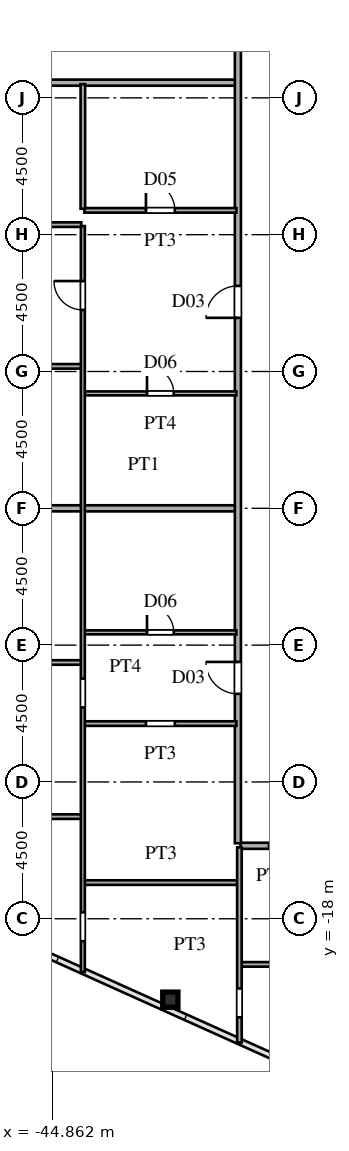
"""IFC4 building model, lengths in metres.
Left out: names, types, materials, properties, quantities, classifications, styles, units other than length and angle.
Written with IfcOpenShell. Run it as: python <this file> out.ifc"""

import sys

from ifc_helpers import new_model, si_unit, direction, frame, frame_2d, origin, origin_2d, place, context, subcontext, project, spatial, rectangle, hollow_rectangle, extrude, source, transform, mapped, element, fill, save


model = new_model("IFC4")
c1 = context("Model", 3, precision=1e-05, world=origin(), true_north=direction((0.0, 1.0)))
c2 = subcontext(c1, "Body", "Model", "MODEL_VIEW")
j1 = project(units=[si_unit("LENGTHUNIT", "METRE"), si_unit("PLANEANGLEUNIT", "RADIAN")], contexts=[c1])
p1 = place(None, origin())
s1 = spatial("IfcSite", under=j1, at=p1, CompositionType="ELEMENT")
p2 = place(p1, origin())
s2 = spatial("IfcBuilding", under=s1, at=p2, CompositionType="ELEMENT")
p3 = place(p2, frame((0.0, 0.0, 65.7)))
s3 = spatial("IfcBuildingStorey", under=s2, at=p3, CompositionType="ELEMENT", Elevation=65.7)
m1 = source(origin(), c2, "Body", "SweptSolid", [
    extrude(hollow_rectangle(XDim=0.5, YDim=0.5, WallThickness=0.02, at=origin_2d()), origin(), (0.0, 0.0, 1.0), 3.6),
])
p4 = place(p3, frame((-40.973, -20.661, 0.0), z_axis=(0.0, 0.0, 1.0), x_axis=(1.0, 0.0, 0.0)))
e1 = element("IfcColumn", 1, at=p4, inside=s3, PredefinedType="COLUMN", context=c2, shape_type="MappedRepresentation", body=[
    mapped(m1, transform((0.0, 0.0, 0.0), scale=1.0)),
])
p5 = place(p3, frame((-38.65, -19.5, 0.0), z_axis=(0.0, 0.0, 1.0), x_axis=(1.0, 0.0, 0.0)))
e2 = element("IfcWall", 2, at=p5, inside=s3, PredefinedType="PARTITIONING", context=c2, shape_type="SweptSolid", body=[
    extrude(rectangle(XDim=11.185, YDim=0.15, at=frame_2d((5.592, 0.0))), origin(), (0.0, 0.0, 1.0), 3.38),
])
p6 = place(p5, frame((5.075, 0.0, 0.0)))
e3 = element("IfcOpeningElement", 3, at=p6, cuts=e2, PredefinedType="OPENING", context=c2, shape_type="SweptSolid", body=[
    extrude(rectangle(XDim=0.95, YDim=2.15, at=frame_2d((0.475, 1.075))), frame((0.0, 0.085, 0.0), z_axis=(0.0, -1.0, 0.0), x_axis=(1.0, 0.0, 0.0)), (0.0, 0.0, 1.0), 0.17),
])
p7 = place(p3, frame((-43.8, -16.81, 0.0), z_axis=(0.0, 0.0, 1.0), x_axis=(1.0, 0.0, 0.0)))
e4 = element("IfcWall", 4, at=p7, inside=s3, PredefinedType="PARTITIONING", context=c2, shape_type="SweptSolid", body=[
    extrude(rectangle(XDim=5.05, YDim=0.15, at=frame_2d((2.525, 0.0))), origin(), (0.0, 0.0, 1.0), 3.38),
])
p8 = place(p3, frame((-38.665, -15.6, 0.0), z_axis=(0.0, 0.0, 1.0), x_axis=(1.0, 0.0, 0.0)))
e5 = element("IfcWall", 5, at=p8, inside=s3, PredefinedType="PARTITIONING", context=c2, shape_type="SweptSolid", body=[
    extrude(rectangle(XDim=2.08, YDim=0.2, at=frame_2d((1.04, 0.0))), origin(), (0.0, 0.0, 1.0), 3.38),
])
p9 = place(p3, frame((-54.45, -14.64, 0.0), z_axis=(0.0, 0.0, 1.0), x_axis=(1.0, 0.0, 0.0)))
e6 = element("IfcWall", 6, at=p9, inside=s3, PredefinedType="PARTITIONING", context=c2, shape_type="SweptSolid", body=[
    extrude(rectangle(XDim=10.55, YDim=0.15, at=frame_2d((5.275, 0.0))), origin(), (0.0, 0.0, 1.0), 3.38),
])
p10 = place(p9, frame((4.8, 0.0, 0.0)))
e7 = element("IfcOpeningElement", 7, at=p10, cuts=e6, PredefinedType="OPENING", context=c2, shape_type="SweptSolid", body=[
    extrude(rectangle(XDim=0.95, YDim=2.15, at=frame_2d((0.475, 1.075))), frame((0.0, 0.085, 0.0), z_axis=(0.0, -1.0, 0.0), x_axis=(1.0, 0.0, 0.0)), (0.0, 0.0, 1.0), 0.17),
])
p11 = place(p3, frame((-43.8, -11.58, 0.0), z_axis=(0.0, 0.0, 1.0), x_axis=(1.0, 0.0, 0.0)))
e8 = element("IfcWall", 8, at=p11, inside=s3, PredefinedType="PARTITIONING", context=c2, shape_type="SweptSolid", body=[
    extrude(rectangle(XDim=5.0, YDim=0.15, at=frame_2d((2.5, 0.0))), origin(), (0.0, 0.0, 1.0), 3.38),
])
p12 = place(p11, frame((2.025, 0.0, 0.0)))
e9 = element("IfcOpeningElement", 9, at=p12, cuts=e8, PredefinedType="OPENING", context=c2, shape_type="SweptSolid", body=[
    extrude(rectangle(XDim=0.95, YDim=2.15, at=frame_2d((0.475, 1.075))), frame((0.0, 0.085, 0.0), z_axis=(0.0, -1.0, 0.0), x_axis=(1.0, 0.0, 0.0)), (0.0, 0.0, 1.0), 0.17),
])
p13 = place(p3, frame((-66.429, -9.57, 0.0), z_axis=(0.0, 0.0, 1.0), x_axis=(1.0, 0.0, 0.0)))
e10 = element("IfcWall", 10, at=p13, inside=s3, PredefinedType="PARTITIONING", context=c2, shape_type="SweptSolid", body=[
    extrude(rectangle(XDim=22.529, YDim=0.15, at=frame_2d((11.265, 0.0))), origin(), (0.0, 0.0, 1.0), 3.38),
])
p14 = place(p13, frame((16.779, 0.0, 0.0)))
e11 = element("IfcOpeningElement", 11, at=p14, cuts=e10, PredefinedType="OPENING", context=c2, shape_type="SweptSolid", body=[
    extrude(rectangle(XDim=0.95, YDim=2.15, at=frame_2d((0.475, 1.075))), frame((0.0, 0.085, 0.0), z_axis=(0.0, -1.0, 0.0), x_axis=(1.0, 0.0, 0.0)), (0.0, 0.0, 1.0), 0.17),
])
p15 = place(p3, frame((-43.8, -8.58, 0.0), z_axis=(0.0, 0.0, 1.0), x_axis=(1.0, 0.0, 0.0)))
e12 = element("IfcWall", 12, at=p15, inside=s3, PredefinedType="PARTITIONING", context=c2, shape_type="SweptSolid", body=[
    extrude(rectangle(XDim=5.0, YDim=0.13, at=frame_2d((2.5, 0.0))), origin(), (0.0, 0.0, 1.0), 3.38),
])
p16 = place(p15, frame((2.06, 0.0, 0.0)))
e13 = element("IfcOpeningElement", 13, at=p16, cuts=e12, PredefinedType="OPENING", context=c2, shape_type="SweptSolid", body=[
    extrude(rectangle(XDim=0.88, YDim=2.1, at=frame_2d((0.44, 1.05))), frame((0.0, 0.075, 0.0), z_axis=(0.0, -1.0, 0.0), x_axis=(1.0, 0.0, 0.0)), (0.0, 0.0, 1.0), 0.15),
])
p17 = place(p3, frame((-54.52, -4.5, 0.0), z_axis=(0.0, 0.0, 1.0), x_axis=(1.0, 0.0, 0.0)))
e14 = element("IfcWall", 14, at=p17, inside=s3, PredefinedType="PARTITIONING", context=c2, shape_type="SweptSolid", body=[
    extrude(rectangle(XDim=15.69, YDim=0.2, at=frame_2d((7.845, 0.0))), origin(), (0.0, 0.0, 1.0), 2.68),
])
p18 = place(p3, frame((-43.8, -0.72, 0.0), z_axis=(0.0, 0.0, 1.0), x_axis=(1.0, 0.0, 0.0)))
e15 = element("IfcWall", 15, at=p18, inside=s3, PredefinedType="PARTITIONING", context=c2, shape_type="SweptSolid", body=[
    extrude(rectangle(XDim=5.0, YDim=0.13, at=frame_2d((2.5, 0.0))), origin(), (0.0, 0.0, 1.0), 3.38),
])
p19 = place(p18, frame((2.06, 0.0, 0.0)))
e16 = element("IfcOpeningElement", 16, at=p19, cuts=e15, PredefinedType="OPENING", context=c2, shape_type="SweptSolid", body=[
    extrude(rectangle(XDim=0.88, YDim=2.1, at=frame_2d((0.44, 1.05))), frame((0.0, 0.075, 0.0), z_axis=(0.0, -1.0, 0.0), x_axis=(1.0, 0.0, 0.0)), (0.0, 0.0, 1.0), 0.15),
])
p20 = place(p3, frame((-71.035, 0.17, 0.0), z_axis=(0.0, 0.0, 1.0), x_axis=(1.0, 0.0, 0.0)))
e17 = element("IfcWall", 17, at=p20, inside=s3, PredefinedType="PARTITIONING", context=c2, shape_type="SweptSolid", body=[
    extrude(rectangle(XDim=27.135, YDim=0.15, at=frame_2d((13.567, 0.0))), origin(), (0.0, 0.0, 1.0), 3.38),
])
p21 = place(p20, frame((21.385, 0.0, 0.0)))
e18 = element("IfcOpeningElement", 18, at=p21, cuts=e17, PredefinedType="OPENING", context=c2, shape_type="SweptSolid", body=[
    extrude(rectangle(XDim=0.95, YDim=2.15, at=frame_2d((0.475, 1.075))), frame((0.0, 0.085, 0.0), z_axis=(0.0, -1.0, 0.0), x_axis=(1.0, 0.0, 0.0)), (0.0, 0.0, 1.0), 0.17),
])
p22 = place(p20, frame((13.21, 0.0, 0.0)))
e19 = element("IfcOpeningElement", 19, at=p22, cuts=e17, PredefinedType="OPENING", context=c2, shape_type="SweptSolid", body=[
    extrude(rectangle(XDim=0.95, YDim=2.15, at=frame_2d((0.475, 1.075))), frame((0.0, 0.085, 0.0), z_axis=(0.0, -1.0, 0.0), x_axis=(1.0, 0.0, 0.0)), (0.0, 0.0, 1.0), 0.17),
])
p23 = place(p3, frame((-71.035, 4.83, 0.0), z_axis=(0.0, 0.0, 1.0), x_axis=(1.0, 0.0, 0.0)))
e20 = element("IfcWall", 20, at=p23, inside=s3, PredefinedType="PARTITIONING", context=c2, shape_type="SweptSolid", body=[
    extrude(rectangle(XDim=27.135, YDim=0.15, at=frame_2d((13.567, 0.0))), origin(), (0.0, 0.0, 1.0), 3.38),
])
p24 = place(p23, frame((21.385, 0.0, 0.0)))
e21 = element("IfcOpeningElement", 21, at=p24, cuts=e20, PredefinedType="OPENING", context=c2, shape_type="SweptSolid", body=[
    extrude(rectangle(XDim=0.95, YDim=2.15, at=frame_2d((0.475, 1.075))), frame((0.0, 0.085, 0.0), z_axis=(0.0, -1.0, 0.0), x_axis=(1.0, 0.0, 0.0)), (0.0, 0.0, 1.0), 0.17),
])
p25 = place(p23, frame((13.21, 0.0, 0.0)))
e22 = element("IfcOpeningElement", 22, at=p25, cuts=e20, PredefinedType="OPENING", context=c2, shape_type="SweptSolid", body=[
    extrude(rectangle(XDim=0.95, YDim=2.15, at=frame_2d((0.475, 1.075))), frame((0.0, 0.085, 0.0), z_axis=(0.0, -1.0, 0.0), x_axis=(1.0, 0.0, 0.0)), (0.0, 0.0, 1.0), 0.17),
])
p26 = place(p3, frame((-43.8, 5.3, 0.0), z_axis=(0.0, 0.0, 1.0), x_axis=(1.0, 0.0, 0.0)))
e23 = element("IfcWall", 23, at=p26, inside=s3, PredefinedType="PARTITIONING", context=c2, shape_type="SweptSolid", body=[
    extrude(rectangle(XDim=5.0, YDim=0.15, at=frame_2d((2.5, 0.0))), origin(), (0.0, 0.0, 1.0), 3.38),
])
p27 = place(p26, frame((2.025, 0.0, 0.0)))
e24 = element("IfcOpeningElement", 24, at=p27, cuts=e23, PredefinedType="OPENING", context=c2, shape_type="SweptSolid", body=[
    extrude(rectangle(XDim=0.95, YDim=2.15, at=frame_2d((0.475, 1.075))), frame((0.0, 0.085, 0.0), z_axis=(0.0, -1.0, 0.0), x_axis=(1.0, 0.0, 0.0)), (0.0, 0.0, 1.0), 0.17),
])
p28 = place(p3, frame((-66.568, 9.5, 0.0), z_axis=(0.0, 0.0, 1.0), x_axis=(1.0, 0.0, 0.0)))
e25 = element("IfcWall", 25, at=p28, inside=s3, PredefinedType="PARTITIONING", context=c2, shape_type="SweptSolid", body=[
    extrude(rectangle(XDim=27.738, YDim=0.2, at=frame_2d((13.869, 0.0))), origin(), (0.0, 0.0, 1.0), 3.38),
])
p29 = place(p3, frame((-43.85, -19.753, 0.0), z_axis=(0.0, 0.0, 1.0), x_axis=(0.0, 1.0, 0.0)))
e26 = element("IfcWall", 26, at=p29, inside=s3, PredefinedType="PARTITIONING", context=c2, shape_type="SweptSolid", body=[
    extrude(rectangle(XDim=24.536, YDim=0.13, at=frame_2d((12.268, 0.0))), origin(), (0.0, 0.0, 1.0), 3.38),
])
p30 = place(p29, frame((8.703, 0.0, 0.0)))
e27 = element("IfcOpeningElement", 27, at=p30, cuts=e26, PredefinedType="OPENING", context=c2, shape_type="SweptSolid", body=[
    extrude(rectangle(XDim=0.95, YDim=2.15, at=frame_2d((0.475, 1.075))), frame((0.0, 0.075, 0.0), z_axis=(0.0, -1.0, 0.0), x_axis=(1.0, 0.0, 0.0)), (0.0, 0.0, 1.0), 0.15),
])
p31 = place(p29, frame((1.016, 0.0, 0.0)))
e28 = element("IfcOpeningElement", 28, at=p31, cuts=e26, PredefinedType="OPENING", context=c2, shape_type="SweptSolid", body=[
    extrude(rectangle(XDim=0.95, YDim=2.15, at=frame_2d((0.475, 1.075))), frame((0.0, 0.075, 0.0), z_axis=(0.0, -1.0, 0.0), x_axis=(1.0, 0.0, 0.0)), (0.0, 0.0, 1.0), 0.15),
])
p32 = place(p29, frame((21.778, 0.0, 0.0)))
e29 = element("IfcOpeningElement", 29, at=p32, cuts=e26, PredefinedType="OPENING", context=c2, shape_type="SweptSolid", body=[
    extrude(rectangle(XDim=0.95, YDim=2.15, at=frame_2d((0.475, 1.075))), frame((0.0, 0.075, 0.0), z_axis=(0.0, -1.0, 0.0), x_axis=(1.0, 0.0, 0.0)), (0.0, 0.0, 1.0), 0.15),
])
p33 = place(p3, frame((-43.85, 5.352, 0.0), z_axis=(0.0, 0.0, 1.0), x_axis=(0.0, 1.0, 0.0)))
e30 = element("IfcWall", 30, at=p33, inside=s3, PredefinedType="PARTITIONING", context=c2, shape_type="SweptSolid", body=[
    extrude(rectangle(XDim=4.098, YDim=0.15, at=frame_2d((2.049, 0.0))), origin(), (0.0, 0.0, 1.0), 3.38),
])
p34 = place(p3, frame((-38.75, -15.515, 0.0), z_axis=(0.0, 0.0, 1.0), x_axis=(0.0, 1.0, 0.0)))
e31 = element("IfcWall", 31, at=p34, inside=s3, PredefinedType="PARTITIONING", context=c2, shape_type="SweptSolid", body=[
    extrude(rectangle(XDim=31.03, YDim=0.2, at=frame_2d((15.515, 0.0))), origin(), (0.0, 0.0, 1.0), 3.38),
])
p35 = place(p34, frame((4.913, 0.0, 0.0)))
e32 = element("IfcOpeningElement", 32, at=p35, cuts=e31, PredefinedType="OPENING", context=c2, shape_type="SweptSolid", body=[
    extrude(rectangle(XDim=1.05, YDim=2.25, at=frame_2d((0.525, 1.125))), frame((0.0, 0.11, 0.0), z_axis=(0.0, -1.0, 0.0), x_axis=(1.0, 0.0, 0.0)), (0.0, 0.0, 1.0), 0.22),
])
p36 = place(p34, frame((17.28, 0.0, 0.0)))
e33 = element("IfcOpeningElement", 33, at=p36, cuts=e31, PredefinedType="OPENING", context=c2, shape_type="SweptSolid", body=[
    extrude(rectangle(XDim=1.05, YDim=2.25, at=frame_2d((0.525, 1.125))), frame((0.0, 0.11, 0.0), z_axis=(0.0, -1.0, 0.0), x_axis=(1.0, 0.0, 0.0)), (0.0, 0.0, 1.0), 0.22),
])
p37 = place(p34, frame((27.54, 0.0, 0.0)))
e34 = element("IfcOpeningElement", 34, at=p37, cuts=e31, PredefinedType="OPENING", context=c2, shape_type="SweptSolid", body=[
    extrude(rectangle(XDim=1.05, YDim=2.25, at=frame_2d((0.525, 1.125))), frame((0.0, 0.11, 0.0), z_axis=(0.0, -1.0, 0.0), x_axis=(1.0, 0.0, 0.0)), (0.0, 0.0, 1.0), 0.22),
])
p38 = place(p3, frame((-38.7, -22.07, 0.0), z_axis=(0.0, 0.0, 1.0), x_axis=(0.0, 1.0, 0.0)))
e35 = element("IfcWall", 35, at=p38, inside=s3, PredefinedType="PARTITIONING", context=c2, shape_type="SweptSolid", body=[
    extrude(rectangle(XDim=6.42, YDim=0.15, at=frame_2d((3.21, 0.0))), origin(), (0.0, 0.0, 1.0), 3.38),
])
p39 = place(p38, frame((0.827, 0.0, 0.0)))
e36 = element("IfcOpeningElement", 36, at=p39, cuts=e35, PredefinedType="OPENING", context=c2, shape_type="SweptSolid", body=[
    extrude(rectangle(XDim=0.95, YDim=2.15, at=frame_2d((0.475, 1.075))), frame((0.0, 0.085, 0.0), z_axis=(0.0, -1.0, 0.0), x_axis=(1.0, 0.0, 0.0)), (0.0, 0.0, 1.0), 0.17),
])
m2 = source(origin(), c2, "Body", "SweptSolid", [
    extrude(rectangle(XDim=0.88, YDim=2.1, at=frame_2d((0.44, 1.05))), frame((0.0, 0.025, 0.0), z_axis=(0.0, -1.0, 0.0), x_axis=(1.0, 0.0, 0.0)), (0.0, 0.0, 1.0), 0.05),
])
p40 = place(p16, origin())
e37 = element("IfcDoor", 37, at=p40, inside=s3, OperationType="SINGLE_SWING_LEFT", PredefinedType="DOOR", context=c2, shape_type="MappedRepresentation", body=[
    mapped(m2, transform((0.0, 0.0, 0.0), scale=1.0)),
])
fill(e13, e37)
p41 = place(p19, origin())
e38 = element("IfcDoor", 38, at=p41, inside=s3, OperationType="SINGLE_SWING_LEFT", PredefinedType="DOOR", context=c2, shape_type="MappedRepresentation", body=[
    mapped(m2, transform((0.0, 0.0, 0.0), scale=1.0)),
])
fill(e16, e38)
m3 = source(origin(), c2, "Body", "SweptSolid", [
    extrude(rectangle(XDim=0.95, YDim=2.15, at=frame_2d((0.475, 1.075))), frame((0.0, 0.025, 0.0), z_axis=(0.0, -1.0, 0.0), x_axis=(1.0, 0.0, 0.0)), (0.0, 0.0, 1.0), 0.05),
])
p42 = place(p27, origin())
e39 = element("IfcDoor", 39, at=p42, inside=s3, OperationType="SINGLE_SWING_LEFT", PredefinedType="DOOR", context=c2, shape_type="MappedRepresentation", body=[
    mapped(m3, transform((0.0, 0.0, 0.0), scale=1.0)),
])
fill(e24, e39)
p43 = place(p32, origin())
e40 = element("IfcDoor", 40, at=p43, inside=s3, OperationType="SINGLE_SWING_RIGHT", PredefinedType="DOOR", context=c2, shape_type="MappedRepresentation", body=[
    mapped(m3, transform((0.0, 0.0, 0.0), scale=1.0)),
])
fill(e29, e40)
m4 = source(origin(), c2, "Body", "SweptSolid", [
    extrude(rectangle(XDim=1.05, YDim=2.25, at=frame_2d((0.525, 1.125))), frame((0.0, 0.025, 0.0), z_axis=(0.0, -1.0, 0.0), x_axis=(1.0, 0.0, 0.0)), (0.0, 0.0, 1.0), 0.05),
])
p44 = place(p35, origin())
e41 = element("IfcDoor", 41, at=p44, inside=s3, OperationType="SINGLE_SWING_RIGHT", PredefinedType="DOOR", context=c2, shape_type="MappedRepresentation", body=[
    mapped(m4, transform((0.0, 0.0, 0.0), scale=1.0)),
])
fill(e32, e41)
p45 = place(p36, origin())
e42 = element("IfcDoor", 42, at=p45, inside=s3, OperationType="SINGLE_SWING_LEFT", PredefinedType="DOOR", context=c2, shape_type="MappedRepresentation", body=[
    mapped(m4, transform((0.0, 0.0, 0.0), scale=1.0)),
])
fill(e33, e42)
save(model, sys.argv[1])
